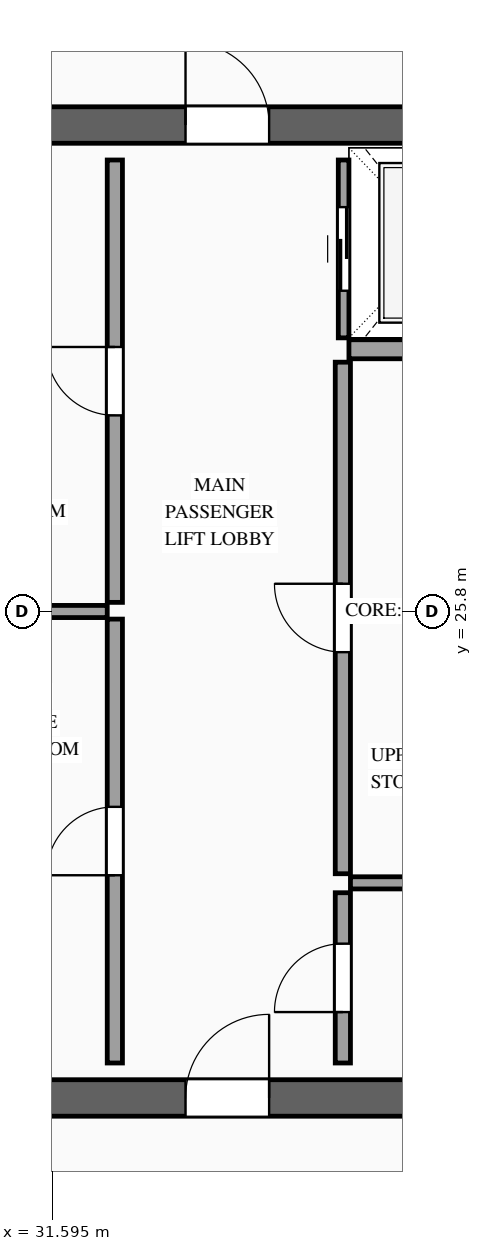
"""IFC4 building model, lengths in metres.
Left out: names, types, materials, properties, quantities, classifications, styles, units other than length and angle.
Written with IfcOpenShell. Run it as: python <this file> out.ifc"""

import sys

from ifc_helpers import new_model, si_unit, direction, frame, frame_2d, origin, place, context, subcontext, project, spatial, rectangle, extrude, source, transform, mapped, element, fill, save


model = new_model("IFC4")
c1 = context("Model", 3, precision=1e-05, world=origin(), true_north=direction((0.0, 1.0)))
c2 = subcontext(c1, "Body", "Model", "MODEL_VIEW")
j1 = project(units=[si_unit("LENGTHUNIT", "METRE"), si_unit("PLANEANGLEUNIT", "RADIAN")], contexts=[c1])
p1 = place(None, origin())
s1 = spatial("IfcSite", under=j1, at=p1, CompositionType="ELEMENT")
p2 = place(p1, origin())
s2 = spatial("IfcBuilding", under=s1, at=p2, CompositionType="ELEMENT")
p3 = place(p2, frame((0.0, 0.0, 303.1)))
s3 = spatial("IfcBuildingStorey", under=s2, at=p3, CompositionType="ELEMENT", Elevation=303.1)
p4 = place(p3, frame((23.56, 19.4, 0.0), z_axis=(0.0, 0.0, 1.0), x_axis=(1.0, 0.0, 0.0)))
e1 = element("IfcWall", 1, at=p4, inside=s3, PredefinedType="SHEAR", context=c2, shape_type="SweptSolid", body=[
    extrude(rectangle(XDim=26.88, YDim=0.48, at=frame_2d((13.44, 0.0))), origin(), (0.0, 0.0, 1.0), 3.5),
])
p5 = place(p4, frame((1.89, 0.0, 0.0)))
e2 = element("IfcOpeningElement", 2, at=p5, cuts=e1, PredefinedType="OPENING", context=c2, shape_type="SweptSolid", body=[
    extrude(rectangle(XDim=1.1, YDim=2.2, at=frame_2d((0.55, 1.1))), frame((0.0, 0.255, 0.0), z_axis=(0.0, -1.0, 0.0), x_axis=(1.0, 0.0, 0.0)), (0.0, 0.0, 1.0), 0.51),
])
p6 = place(p4, frame((9.79, 0.0, 0.0)))
e3 = element("IfcOpeningElement", 3, at=p6, cuts=e1, PredefinedType="OPENING", context=c2, shape_type="SweptSolid", body=[
    extrude(rectangle(XDim=1.1, YDim=2.2, at=frame_2d((0.55, 1.1))), frame((0.0, 0.255, 0.0), z_axis=(0.0, -1.0, 0.0), x_axis=(1.0, 0.0, 0.0)), (0.0, 0.0, 1.0), 0.51),
])
p7 = place(p4, frame((22.99, 0.0, 0.0)))
e4 = element("IfcOpeningElement", 4, at=p7, cuts=e1, PredefinedType="OPENING", context=c2, shape_type="SweptSolid", body=[
    extrude(rectangle(XDim=1.1, YDim=2.2, at=frame_2d((0.55, 1.1))), frame((0.0, 0.255, 0.0), z_axis=(0.0, -1.0, 0.0), x_axis=(1.0, 0.0, 0.0)), (0.0, 0.0, 1.0), 0.51),
])
p8 = place(p4, frame((19.61, 0.0, 0.0)))
e5 = element("IfcOpeningElement", 5, at=p8, cuts=e1, PredefinedType="OPENING", context=c2, shape_type="SweptSolid", body=[
    extrude(rectangle(XDim=0.9, YDim=2.15, at=frame_2d((0.45, 1.075))), frame((0.0, 0.255, 0.0), z_axis=(0.0, -1.0, 0.0), x_axis=(1.0, 0.0, 0.0)), (0.0, 0.0, 1.0), 0.51),
])
p9 = place(p4, frame((18.17, 0.0, 0.0)))
e6 = element("IfcOpeningElement", 6, at=p9, cuts=e1, PredefinedType="OPENING", context=c2, shape_type="SweptSolid", body=[
    extrude(rectangle(XDim=0.9, YDim=2.15, at=frame_2d((0.45, 1.075))), frame((0.0, 0.255, 0.0), z_axis=(0.0, -1.0, 0.0), x_axis=(1.0, 0.0, 0.0)), (0.0, 0.0, 1.0), 0.51),
])
p10 = place(p3, frame((23.56, 32.2, 0.0), z_axis=(0.0, 0.0, 1.0), x_axis=(1.0, 0.0, 0.0)))
e7 = element("IfcWall", 7, at=p10, inside=s3, PredefinedType="SHEAR", context=c2, shape_type="SweptSolid", body=[
    extrude(rectangle(XDim=26.88, YDim=0.48, at=frame_2d((13.44, 0.0))), origin(), (0.0, 0.0, 1.0), 3.5),
])
p11 = place(p10, frame((4.51, 0.0, 0.0)))
e8 = element("IfcOpeningElement", 8, at=p11, cuts=e7, PredefinedType="OPENING", context=c2, shape_type="SweptSolid", body=[
    extrude(rectangle(XDim=0.9, YDim=2.15, at=frame_2d((0.45, 1.075))), frame((0.0, 0.255, 0.0), z_axis=(0.0, -1.0, 0.0), x_axis=(1.0, 0.0, 0.0)), (0.0, 0.0, 1.0), 0.51),
])
p12 = place(p10, frame((9.79, 0.0, 0.0)))
e9 = element("IfcOpeningElement", 9, at=p12, cuts=e7, PredefinedType="OPENING", context=c2, shape_type="SweptSolid", body=[
    extrude(rectangle(XDim=1.1, YDim=2.2, at=frame_2d((0.55, 1.1))), frame((0.0, 0.255, 0.0), z_axis=(0.0, -1.0, 0.0), x_axis=(1.0, 0.0, 0.0)), (0.0, 0.0, 1.0), 0.51),
])
p13 = place(p10, frame((15.64, 0.0, 0.0)))
e10 = element("IfcOpeningElement", 10, at=p13, cuts=e7, PredefinedType="OPENING", context=c2, shape_type="SweptSolid", body=[
    extrude(rectangle(XDim=1.1, YDim=2.2, at=frame_2d((0.55, 1.1))), frame((0.0, 0.255, 0.0), z_axis=(0.0, -1.0, 0.0), x_axis=(1.0, 0.0, 0.0)), (0.0, 0.0, 1.0), 0.51),
])
p14 = place(p10, frame((18.74, 0.0, 0.0)))
e11 = element("IfcOpeningElement", 11, at=p14, cuts=e7, PredefinedType="OPENING", context=c2, shape_type="SweptSolid", body=[
    extrude(rectangle(XDim=1.1, YDim=2.2, at=frame_2d((0.55, 1.1))), frame((0.0, 0.255, 0.0), z_axis=(0.0, -1.0, 0.0), x_axis=(1.0, 0.0, 0.0)), (0.0, 0.0, 1.0), 0.51),
])
p15 = place(p3, frame((35.43, 29.4, 0.0), z_axis=(0.0, 0.0, 1.0), x_axis=(0.0, 1.0, 0.0)))
e12 = element("IfcWall", 12, at=p15, inside=s3, PredefinedType="SOLIDWALL", context=c2, shape_type="SweptSolid", body=[
    extrude(rectangle(XDim=2.34, YDim=0.14, at=frame_2d((1.17, 0.0))), origin(), (0.0, 0.0, 1.0), 3.22),
])
p16 = place(p15, frame((0.62, 0.0, 0.0)))
e13 = element("IfcOpeningElement", 13, at=p16, cuts=e12, PredefinedType="OPENING", context=c2, shape_type="SweptSolid", body=[
    extrude(rectangle(XDim=1.1, YDim=2.2, at=frame_2d((0.55, 1.1))), frame((0.0, 0.085, 0.0), z_axis=(0.0, -1.0, 0.0), x_axis=(1.0, 0.0, 0.0)), (0.0, 0.0, 1.0), 0.17),
])
m1 = source(origin(), c2, "Body", "SweptSolid", [
    extrude(rectangle(XDim=2.4, YDim=0.25, at=frame_2d((1.2, 0.0))), origin(), (0.0, 0.0, 1.0), 3.22),
])
p17 = place(p3, frame((35.5, 29.25, 0.0), z_axis=(0.0, 0.0, 1.0), x_axis=(1.0, 0.0, 0.0)))
e14 = element("IfcWall", 14, at=p17, inside=s3, PredefinedType="SOLIDWALL", context=c2, shape_type="MappedRepresentation", body=[
    mapped(m1, transform((0.0, 0.0, 0.0), scale=1.0)),
])
p18 = place(p3, frame((32.42, 19.86, 0.0), z_axis=(0.0, 0.0, 1.0), x_axis=(0.0, 1.0, 0.0)))
e15 = element("IfcWall", 15, at=p18, inside=s3, PredefinedType="PARTITIONING", context=c2, shape_type="SweptSolid", body=[
    extrude(rectangle(XDim=5.84, YDim=0.2, at=frame_2d((2.92, 0.0))), origin(), (0.0, 0.0, 1.0), 3.22),
])
p19 = place(p18, frame((2.47, 0.0, 0.0)))
e16 = element("IfcOpeningElement", 16, at=p19, cuts=e15, PredefinedType="OPENING", context=c2, shape_type="SweptSolid", body=[
    extrude(rectangle(XDim=0.9, YDim=2.15, at=frame_2d((0.45, 1.075))), frame((0.0, 0.115, 0.0), z_axis=(0.0, -1.0, 0.0), x_axis=(1.0, 0.0, 0.0)), (0.0, 0.0, 1.0), 0.23),
])
p20 = place(p3, frame((32.42, 25.92, 0.0), z_axis=(0.0, 0.0, 1.0), x_axis=(0.0, 1.0, 0.0)))
e17 = element("IfcWall", 17, at=p20, inside=s3, PredefinedType="PARTITIONING", context=c2, shape_type="SweptSolid", body=[
    extrude(rectangle(XDim=5.82, YDim=0.2, at=frame_2d((2.91, 0.0))), origin(), (0.0, 0.0, 1.0), 3.22),
])
p21 = place(p20, frame((2.46, 0.0, 0.0)))
e18 = element("IfcOpeningElement", 18, at=p21, cuts=e17, PredefinedType="OPENING", context=c2, shape_type="SweptSolid", body=[
    extrude(rectangle(XDim=0.9, YDim=2.15, at=frame_2d((0.45, 1.075))), frame((0.0, 0.115, 0.0), z_axis=(0.0, -1.0, 0.0), x_axis=(1.0, 0.0, 0.0)), (0.0, 0.0, 1.0), 0.23),
])
m2 = source(origin(), c2, "Body", "SweptSolid", [
    extrude(rectangle(XDim=2.47, YDim=0.16, at=frame_2d((1.235, 0.0))), origin(), (0.0, 0.0, 1.0), 3.22),
])
p22 = place(p3, frame((29.85, 25.8, 0.0), z_axis=(0.0, 0.0, 1.0), x_axis=(1.0, 0.0, 0.0)))
e19 = element("IfcWall", 19, at=p22, inside=s3, PredefinedType="PARTITIONING", context=c2, shape_type="MappedRepresentation", body=[
    mapped(m2, transform((0.0, 0.0, 0.0), scale=1.0)),
])
p23 = place(p3, frame((35.42, 19.86, 0.0), z_axis=(0.0, 0.0, 1.0), x_axis=(0.0, 1.0, 0.0)))
e20 = element("IfcWall", 20, at=p23, inside=s3, PredefinedType="PARTITIONING", context=c2, shape_type="SweptSolid", body=[
    extrude(rectangle(XDim=2.24, YDim=0.2, at=frame_2d((1.12, 0.0))), origin(), (0.0, 0.0, 1.0), 3.22),
])
p24 = place(p23, frame((0.67, 0.0, 0.0)))
e21 = element("IfcOpeningElement", 21, at=p24, cuts=e20, PredefinedType="OPENING", context=c2, shape_type="SweptSolid", body=[
    extrude(rectangle(XDim=0.9, YDim=2.15, at=frame_2d((0.45, 1.075))), frame((0.0, 0.115, 0.0), z_axis=(0.0, -1.0, 0.0), x_axis=(1.0, 0.0, 0.0)), (0.0, 0.0, 1.0), 0.23),
])
p25 = place(p3, frame((35.42, 22.35, 0.0), z_axis=(0.0, 0.0, 1.0), x_axis=(0.0, 1.0, 0.0)))
e22 = element("IfcWall", 22, at=p25, inside=s3, PredefinedType="PARTITIONING", context=c2, shape_type="SweptSolid", body=[
    extrude(rectangle(XDim=6.73, YDim=0.2, at=frame_2d((3.365, 0.0))), origin(), (0.0, 0.0, 1.0), 3.22),
])
p26 = place(p25, frame((2.915, 0.0, 0.0)))
e23 = element("IfcOpeningElement", 23, at=p26, cuts=e22, PredefinedType="OPENING", context=c2, shape_type="SweptSolid", body=[
    extrude(rectangle(XDim=0.9, YDim=2.15, at=frame_2d((0.45, 1.075))), frame((0.0, 0.115, 0.0), z_axis=(0.0, -1.0, 0.0), x_axis=(1.0, 0.0, 0.0)), (0.0, 0.0, 1.0), 0.23),
])
m3 = source(origin(), c2, "Body", "SweptSolid", [
    extrude(rectangle(XDim=2.36, YDim=0.16, at=frame_2d((1.18, 0.0))), origin(), (0.0, 0.0, 1.0), 3.22),
])
p27 = place(p3, frame((35.52, 22.23, 0.0), z_axis=(0.0, 0.0, 1.0), x_axis=(1.0, 0.0, 0.0)))
e24 = element("IfcWall", 24, at=p27, inside=s3, PredefinedType="PARTITIONING", context=c2, shape_type="MappedRepresentation", body=[
    mapped(m3, transform((0.0, 0.0, 0.0), scale=1.0)),
])
m4 = source(origin(), c2, "Body", "SweptSolid", [
    extrude(rectangle(XDim=1.1, YDim=2.2, at=frame_2d((0.55, 1.1))), frame((0.0, 0.025, 0.0), z_axis=(0.0, -1.0, 0.0), x_axis=(1.0, 0.0, 0.0)), (0.0, 0.0, 1.0), 0.05),
])
p28 = place(p16, origin())
e25 = element("IfcDoor", 25, at=p28, inside=s3, OperationType="SLIDING_TO_RIGHT", PredefinedType="DOOR", context=c2, shape_type="MappedRepresentation", body=[
    mapped(m4, transform((0.0, 0.0, 0.0), scale=1.0)),
])
fill(e13, e25)
m5 = source(origin(), c2, "Body", "SweptSolid", [
    extrude(rectangle(XDim=1.1, YDim=2.2, at=frame_2d((0.55, 1.1))), frame((0.0, 0.025, 0.0), z_axis=(0.0, -1.0, 0.0), x_axis=(1.0, 0.0, 0.0)), (0.0, 0.0, 1.0), 0.05),
])
p29 = place(p6, origin())
e26 = element("IfcDoor", 26, at=p29, inside=s3, OperationType="SINGLE_SWING_RIGHT", PredefinedType="DOOR", context=c2, shape_type="MappedRepresentation", body=[
    mapped(m5, transform((0.0, 0.0, 0.0), scale=1.0)),
])
fill(e3, e26)
p30 = place(p12, origin())
e27 = element("IfcDoor", 27, at=p30, inside=s3, OperationType="SINGLE_SWING_LEFT", PredefinedType="DOOR", context=c2, shape_type="MappedRepresentation", body=[
    mapped(m5, transform((0.0, 0.0, 0.0), scale=1.0)),
])
fill(e9, e27)
m6 = source(origin(), c2, "Body", "SweptSolid", [
    extrude(rectangle(XDim=0.9, YDim=2.15, at=frame_2d((0.45, 1.075))), frame((0.0, 0.025, 0.0), z_axis=(0.0, -1.0, 0.0), x_axis=(1.0, 0.0, 0.0)), (0.0, 0.0, 1.0), 0.05),
])
p31 = place(p19, origin())
e28 = element("IfcDoor", 28, at=p31, inside=s3, OperationType="SINGLE_SWING_LEFT", PredefinedType="DOOR", context=c2, shape_type="MappedRepresentation", body=[
    mapped(m6, transform((0.0, 0.0, 0.0), scale=1.0)),
])
fill(e16, e28)
p32 = place(p21, origin())
e29 = element("IfcDoor", 29, at=p32, inside=s3, OperationType="SINGLE_SWING_RIGHT", PredefinedType="DOOR", context=c2, shape_type="MappedRepresentation", body=[
    mapped(m6, transform((0.0, 0.0, 0.0), scale=1.0)),
])
fill(e18, e29)
p33 = place(p24, origin())
e30 = element("IfcDoor", 30, at=p33, inside=s3, OperationType="SINGLE_SWING_LEFT", PredefinedType="DOOR", context=c2, shape_type="MappedRepresentation", body=[
    mapped(m6, transform((0.0, 0.0, 0.0), scale=1.0)),
])
fill(e21, e30)
p34 = place(p26, origin())
e31 = element("IfcDoor", 31, at=p34, inside=s3, OperationType="SINGLE_SWING_RIGHT", PredefinedType="DOOR", context=c2, shape_type="MappedRepresentation", body=[
    mapped(m6, transform((0.0, 0.0, 0.0), scale=1.0)),
])
fill(e23, e31)
save(model, sys.argv[1])
